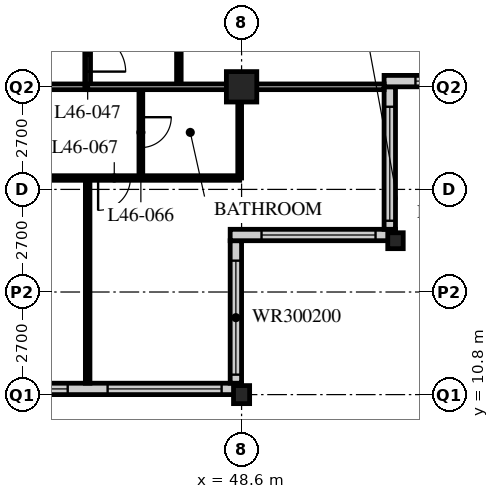
"""IFC4 building model, lengths in metres.
Left out: names, types, materials, properties, quantities, classifications, styles, units other than length and angle.
Written with IfcOpenShell. Run it as: python <this file> out.ifc"""

import sys

from ifc_helpers import new_model, si_unit, direction, frame, frame_2d, origin, origin_2d, place, context, subcontext, project, spatial, rectangle, hollow_rectangle, i_section, extrude, element, fill, save


model = new_model("IFC4")
c1 = context("Model", 3, precision=1e-05, world=origin(), true_north=direction((0.0, 1.0)))
c2 = subcontext(c1, "Body", "Model", "MODEL_VIEW")
j1 = project(units=[si_unit("LENGTHUNIT", "METRE"), si_unit("PLANEANGLEUNIT", "RADIAN")], contexts=[c1])
p1 = place(None, origin())
s1 = spatial("IfcSite", under=j1, at=p1, CompositionType="ELEMENT")
p2 = place(p1, origin())
s2 = spatial("IfcBuilding", under=s1, at=p2, CompositionType="ELEMENT")
p3 = place(p2, frame((0.0, 0.0, 181.2)))
s3 = spatial("IfcBuildingStorey", under=s2, at=p3, CompositionType="ELEMENT", Elevation=181.2)
p4 = place(p3, frame((48.6, 10.8, 0.0), z_axis=(0.0, 0.0, 1.0), x_axis=(1.0, 0.0, 0.0)))
e1 = element("IfcColumn", 1, at=p4, inside=s3, PredefinedType="COLUMN", context=c2, shape_type="SweptSolid", body=[
    extrude(i_section(OverallWidth=0.424, OverallDepth=0.475, WebThickness=0.048, FlangeThickness=0.077, FilletRadius=0.015, at=origin_2d()), origin(), (0.0, 0.0, 1.0), 3.6),
])
p5 = place(p3, frame((48.6, 18.9, 0.0), z_axis=(0.0, 0.0, 1.0), x_axis=(1.0, 0.0, 0.0)))
e2 = element("IfcColumn", 2, at=p5, inside=s3, PredefinedType="COLUMN", context=c2, shape_type="SweptSolid", body=[
    extrude(hollow_rectangle(XDim=0.8, YDim=0.8, WallThickness=0.08, at=origin_2d()), origin(), (0.0, 0.0, 1.0), 3.6),
])
p6 = place(p3, frame((52.65, 14.85, 0.0), z_axis=(0.0, 0.0, 1.0), x_axis=(1.0, 0.0, 0.0)))
e3 = element("IfcColumn", 3, at=p6, inside=s3, PredefinedType="COLUMN", context=c2, shape_type="SweptSolid", body=[
    extrude(i_section(OverallWidth=0.407, OverallDepth=0.419, WebThickness=0.031, FlangeThickness=0.049, FilletRadius=0.015, at=origin_2d()), origin(), (0.0, 0.0, 1.0), 3.6),
])
p7 = place(p3, frame((8.4, 10.95, 0.0), z_axis=(0.0, 0.0, 1.0), x_axis=(1.0, 0.0, 0.0)))
e4 = element("IfcWall", 4, at=p7, inside=s3, PredefinedType="SOLIDWALL", context=c2, shape_type="SweptSolid", body=[
    extrude(rectangle(XDim=40.2, YDim=0.3, at=frame_2d((20.1, 0.0))), origin(), (0.0, 0.0, 1.0), 3.39),
])
p8 = place(p7, frame((0.225, 0.0, 0.6)))
e5 = element("IfcOpeningElement", 5, at=p8, cuts=e4, PredefinedType="OPENING", context=c2, shape_type="SweptSolid", body=[
    extrude(rectangle(XDim=3.0, YDim=2.4, at=frame_2d((1.5, 1.2))), frame((0.0, 0.16, 0.0), z_axis=(0.0, -1.0, 0.0), x_axis=(1.0, 0.0, 0.0)), (0.0, 0.0, 1.0), 0.32),
])
p9 = place(p7, frame((4.275, 0.0, 0.6)))
e6 = element("IfcOpeningElement", 6, at=p9, cuts=e4, PredefinedType="OPENING", context=c2, shape_type="SweptSolid", body=[
    extrude(rectangle(XDim=3.0, YDim=2.4, at=frame_2d((1.5, 1.2))), frame((0.0, 0.16, 0.0), z_axis=(0.0, -1.0, 0.0), x_axis=(1.0, 0.0, 0.0)), (0.0, 0.0, 1.0), 0.32),
])
p10 = place(p7, frame((8.325, 0.0, 0.6)))
e7 = element("IfcOpeningElement", 7, at=p10, cuts=e4, PredefinedType="OPENING", context=c2, shape_type="SweptSolid", body=[
    extrude(rectangle(XDim=3.0, YDim=2.4, at=frame_2d((1.5, 1.2))), frame((0.0, 0.16, 0.0), z_axis=(0.0, -1.0, 0.0), x_axis=(1.0, 0.0, 0.0)), (0.0, 0.0, 1.0), 0.32),
])
p11 = place(p7, frame((12.375, 0.0, 0.6)))
e8 = element("IfcOpeningElement", 8, at=p11, cuts=e4, PredefinedType="OPENING", context=c2, shape_type="SweptSolid", body=[
    extrude(rectangle(XDim=3.0, YDim=2.4, at=frame_2d((1.5, 1.2))), frame((0.0, 0.16, 0.0), z_axis=(0.0, -1.0, 0.0), x_axis=(1.0, 0.0, 0.0)), (0.0, 0.0, 1.0), 0.32),
])
p12 = place(p7, frame((16.425, 0.0, 0.6)))
e9 = element("IfcOpeningElement", 9, at=p12, cuts=e4, PredefinedType="OPENING", context=c2, shape_type="SweptSolid", body=[
    extrude(rectangle(XDim=3.0, YDim=2.4, at=frame_2d((1.5, 1.2))), frame((0.0, 0.16, 0.0), z_axis=(0.0, -1.0, 0.0), x_axis=(1.0, 0.0, 0.0)), (0.0, 0.0, 1.0), 0.32),
])
p13 = place(p7, frame((20.475, 0.0, 0.6)))
e10 = element("IfcOpeningElement", 10, at=p13, cuts=e4, PredefinedType="OPENING", context=c2, shape_type="SweptSolid", body=[
    extrude(rectangle(XDim=3.0, YDim=2.4, at=frame_2d((1.5, 1.2))), frame((0.0, 0.16, 0.0), z_axis=(0.0, -1.0, 0.0), x_axis=(1.0, 0.0, 0.0)), (0.0, 0.0, 1.0), 0.32),
])
p14 = place(p7, frame((24.525, 0.0, 0.6)))
e11 = element("IfcOpeningElement", 11, at=p14, cuts=e4, PredefinedType="OPENING", context=c2, shape_type="SweptSolid", body=[
    extrude(rectangle(XDim=3.0, YDim=2.4, at=frame_2d((1.5, 1.2))), frame((0.0, 0.16, 0.0), z_axis=(0.0, -1.0, 0.0), x_axis=(1.0, 0.0, 0.0)), (0.0, 0.0, 1.0), 0.32),
])
p15 = place(p7, frame((28.575, 0.0, 0.6)))
e12 = element("IfcOpeningElement", 12, at=p15, cuts=e4, PredefinedType="OPENING", context=c2, shape_type="SweptSolid", body=[
    extrude(rectangle(XDim=3.0, YDim=2.4, at=frame_2d((1.5, 1.2))), frame((0.0, 0.16, 0.0), z_axis=(0.0, -1.0, 0.0), x_axis=(1.0, 0.0, 0.0)), (0.0, 0.0, 1.0), 0.32),
])
p16 = place(p7, frame((32.625, 0.0, 0.6)))
e13 = element("IfcOpeningElement", 13, at=p16, cuts=e4, PredefinedType="OPENING", context=c2, shape_type="SweptSolid", body=[
    extrude(rectangle(XDim=3.0, YDim=2.4, at=frame_2d((1.5, 1.2))), frame((0.0, 0.16, 0.0), z_axis=(0.0, -1.0, 0.0), x_axis=(1.0, 0.0, 0.0)), (0.0, 0.0, 1.0), 0.32),
])
p17 = place(p7, frame((36.675, 0.0, 0.6)))
e14 = element("IfcOpeningElement", 14, at=p17, cuts=e4, PredefinedType="OPENING", context=c2, shape_type="SweptSolid", body=[
    extrude(rectangle(XDim=3.0, YDim=2.4, at=frame_2d((1.5, 1.2))), frame((0.0, 0.16, 0.0), z_axis=(0.0, -1.0, 0.0), x_axis=(1.0, 0.0, 0.0)), (0.0, 0.0, 1.0), 0.32),
])
p18 = place(p3, frame((48.45, 11.1, 0.0), z_axis=(0.0, 0.0, 1.0), x_axis=(0.0, 1.0, 0.0)))
e15 = element("IfcWall", 15, at=p18, inside=s3, PredefinedType="SOLIDWALL", context=c2, shape_type="SweptSolid", body=[
    extrude(rectangle(XDim=3.75, YDim=0.3, at=frame_2d((1.875, 0.0))), origin(), (0.0, 0.0, 1.0), 3.39),
])
p19 = place(p18, frame((0.225, 0.0, 0.6)))
e16 = element("IfcOpeningElement", 16, at=p19, cuts=e15, PredefinedType="OPENING", context=c2, shape_type="SweptSolid", body=[
    extrude(rectangle(XDim=3.0, YDim=2.0, at=frame_2d((1.5, 1.0))), frame((0.0, 0.16, 0.0), z_axis=(0.0, -1.0, 0.0), x_axis=(1.0, 0.0, 0.0)), (0.0, 0.0, 1.0), 0.32),
])
p20 = place(p3, frame((48.3, 15.0, 0.0), z_axis=(0.0, 0.0, 1.0), x_axis=(1.0, 0.0, 0.0)))
e17 = element("IfcWall", 17, at=p20, inside=s3, PredefinedType="SOLIDWALL", context=c2, shape_type="SweptSolid", body=[
    extrude(rectangle(XDim=4.35, YDim=0.3, at=frame_2d((2.175, 0.0))), origin(), (0.0, 0.0, 1.0), 3.39),
])
p21 = place(p20, frame((0.825, 0.0, 0.6)))
e18 = element("IfcOpeningElement", 18, at=p21, cuts=e17, PredefinedType="OPENING", context=c2, shape_type="SweptSolid", body=[
    extrude(rectangle(XDim=3.0, YDim=2.0, at=frame_2d((1.5, 1.0))), frame((0.0, 0.16, 0.0), z_axis=(0.0, -1.0, 0.0), x_axis=(1.0, 0.0, 0.0)), (0.0, 0.0, 1.0), 0.32),
])
p22 = place(p3, frame((52.5, 15.15, 0.0), z_axis=(0.0, 0.0, 1.0), x_axis=(0.0, 1.0, 0.0)))
e19 = element("IfcWall", 19, at=p22, inside=s3, PredefinedType="SOLIDWALL", context=c2, shape_type="SweptSolid", body=[
    extrude(rectangle(XDim=3.75, YDim=0.3, at=frame_2d((1.875, 0.0))), origin(), (0.0, 0.0, 1.0), 3.39),
])
p23 = place(p22, frame((0.225, 0.0, 0.6)))
e20 = element("IfcOpeningElement", 20, at=p23, cuts=e19, PredefinedType="OPENING", context=c2, shape_type="SweptSolid", body=[
    extrude(rectangle(XDim=3.0, YDim=2.0, at=frame_2d((1.5, 1.0))), frame((0.0, 0.16, 0.0), z_axis=(0.0, -1.0, 0.0), x_axis=(1.0, 0.0, 0.0)), (0.0, 0.0, 1.0), 0.32),
])
p24 = place(p3, frame((52.35, 19.05, 0.0), z_axis=(0.0, 0.0, 1.0), x_axis=(1.0, 0.0, 0.0)))
e21 = element("IfcWall", 21, at=p24, inside=s3, PredefinedType="SOLIDWALL", context=c2, shape_type="SweptSolid", body=[
    extrude(rectangle(XDim=4.35, YDim=0.3, at=frame_2d((2.175, 0.0))), origin(), (0.0, 0.0, 1.0), 3.39),
])
p25 = place(p24, frame((0.825, 0.0, 0.6)))
e22 = element("IfcOpeningElement", 22, at=p25, cuts=e21, PredefinedType="OPENING", context=c2, shape_type="SweptSolid", body=[
    extrude(rectangle(XDim=3.0, YDim=2.0, at=frame_2d((1.5, 1.0))), frame((0.0, 0.16, 0.0), z_axis=(0.0, -1.0, 0.0), x_axis=(1.0, 0.0, 0.0)), (0.0, 0.0, 1.0), 0.32),
])
p26 = place(p3, frame((12.15, 18.9, 0.0), z_axis=(0.0, 0.0, 1.0), x_axis=(1.0, 0.0, 0.0)))
e23 = element("IfcWall", 23, at=p26, inside=s3, PredefinedType="PARTITIONING", context=c2, shape_type="SweptSolid", body=[
    extrude(rectangle(XDim=32.4, YDim=0.15, at=frame_2d((16.2, 0.0))), origin(), (0.0, 0.0, 1.0), 2.778),
])
p27 = place(p26, frame((4.95, 0.0, 0.0)))
e24 = element("IfcOpeningElement", 24, at=p27, cuts=e23, PredefinedType="OPENING", context=c2, shape_type="SweptSolid", body=[
    extrude(rectangle(XDim=1.0, YDim=2.1, at=frame_2d((0.5, 1.05))), frame((0.0, 0.085, 0.0), z_axis=(0.0, -1.0, 0.0), x_axis=(1.0, 0.0, 0.0)), (0.0, 0.0, 1.0), 0.17),
])
p28 = place(p26, frame((13.05, 0.0, 0.0)))
e25 = element("IfcOpeningElement", 25, at=p28, cuts=e23, PredefinedType="OPENING", context=c2, shape_type="SweptSolid", body=[
    extrude(rectangle(XDim=1.0, YDim=2.1, at=frame_2d((0.5, 1.05))), frame((0.0, 0.085, 0.0), z_axis=(0.0, -1.0, 0.0), x_axis=(1.0, 0.0, 0.0)), (0.0, 0.0, 1.0), 0.17),
])
p29 = place(p26, frame((21.15, 0.0, 0.0)))
e26 = element("IfcOpeningElement", 26, at=p29, cuts=e23, PredefinedType="OPENING", context=c2, shape_type="SweptSolid", body=[
    extrude(rectangle(XDim=1.0, YDim=2.1, at=frame_2d((0.5, 1.05))), frame((0.0, 0.085, 0.0), z_axis=(0.0, -1.0, 0.0), x_axis=(1.0, 0.0, 0.0)), (0.0, 0.0, 1.0), 0.17),
])
p30 = place(p26, frame((1.525, 0.0, 0.0)))
e27 = element("IfcOpeningElement", 27, at=p30, cuts=e23, PredefinedType="OPENING", context=c2, shape_type="SweptSolid", body=[
    extrude(rectangle(XDim=1.0, YDim=2.1, at=frame_2d((0.5, 1.05))), frame((0.0, 0.085, 0.0), z_axis=(0.0, -1.0, 0.0), x_axis=(1.0, 0.0, 0.0)), (0.0, 0.0, 1.0), 0.17),
])
p31 = place(p26, frame((29.875, 0.0, 0.0)))
e28 = element("IfcOpeningElement", 28, at=p31, cuts=e23, PredefinedType="OPENING", context=c2, shape_type="SweptSolid", body=[
    extrude(rectangle(XDim=1.0, YDim=2.1, at=frame_2d((0.5, 1.05))), frame((0.0, 0.085, 0.0), z_axis=(0.0, -1.0, 0.0), x_axis=(1.0, 0.0, 0.0)), (0.0, 0.0, 1.0), 0.17),
])
p32 = place(p3, frame((44.55, 18.9, 0.0), z_axis=(0.0, 0.0, 1.0), x_axis=(0.0, 1.0, 0.0)))
e29 = element("IfcWall", 29, at=p32, inside=s3, PredefinedType="PARTITIONING", context=c2, shape_type="SweptSolid", body=[
    extrude(rectangle(XDim=28.35, YDim=0.15, at=frame_2d((14.175, 0.0))), origin(), (0.0, 0.0, 1.0), 3.39),
])
p33 = place(p32, frame((0.4, 0.0, 0.0)))
e30 = element("IfcOpeningElement", 30, at=p33, cuts=e29, PredefinedType="OPENING", context=c2, shape_type="SweptSolid", body=[
    extrude(rectangle(XDim=1.0, YDim=2.1, at=frame_2d((0.5, 1.05))), frame((0.0, 0.085, 0.0), z_axis=(0.0, -1.0, 0.0), x_axis=(1.0, 0.0, 0.0)), (0.0, 0.0, 1.0), 0.17),
])
p34 = place(p32, frame((10.45, 0.0, 0.0)))
e31 = element("IfcOpeningElement", 31, at=p34, cuts=e29, PredefinedType="OPENING", context=c2, shape_type="SweptSolid", body=[
    extrude(rectangle(XDim=1.0, YDim=2.1, at=frame_2d((0.5, 1.05))), frame((0.0, 0.085, 0.0), z_axis=(0.0, -1.0, 0.0), x_axis=(1.0, 0.0, 0.0)), (0.0, 0.0, 1.0), 0.17),
])
p35 = place(p32, frame((14.5, 0.0, 0.0)))
e32 = element("IfcOpeningElement", 32, at=p35, cuts=e29, PredefinedType="OPENING", context=c2, shape_type="SweptSolid", body=[
    extrude(rectangle(XDim=1.0, YDim=2.1, at=frame_2d((0.5, 1.05))), frame((0.0, 0.085, 0.0), z_axis=(0.0, -1.0, 0.0), x_axis=(1.0, 0.0, 0.0)), (0.0, 0.0, 1.0), 0.17),
])
p36 = place(p32, frame((16.6, 0.0, 0.0)))
e33 = element("IfcOpeningElement", 33, at=p36, cuts=e29, PredefinedType="OPENING", context=c2, shape_type="SweptSolid", body=[
    extrude(rectangle(XDim=1.0, YDim=2.1, at=frame_2d((0.5, 1.05))), frame((0.0, 0.085, 0.0), z_axis=(0.0, -1.0, 0.0), x_axis=(1.0, 0.0, 0.0)), (0.0, 0.0, 1.0), 0.17),
])
p37 = place(p32, frame((26.65, 0.0, 0.0)))
e34 = element("IfcOpeningElement", 34, at=p37, cuts=e29, PredefinedType="OPENING", context=c2, shape_type="SweptSolid", body=[
    extrude(rectangle(XDim=1.0, YDim=2.1, at=frame_2d((0.5, 1.05))), frame((0.0, 0.085, 0.0), z_axis=(0.0, -1.0, 0.0), x_axis=(1.0, 0.0, 0.0)), (0.0, 0.0, 1.0), 0.17),
])
p38 = place(p3, frame((46.95, 18.9, 0.0), z_axis=(0.0, 0.0, 1.0), x_axis=(0.0, 1.0, 0.0)))
e35 = element("IfcWall", 35, at=p38, inside=s3, PredefinedType="PARTITIONING", context=c2, shape_type="SweptSolid", body=[
    extrude(rectangle(XDim=8.1, YDim=0.12, at=frame_2d((4.05, 0.0))), origin(), (0.0, 0.0, 1.0), 3.39),
])
p39 = place(p38, frame((0.975, 0.0, 0.0)))
e36 = element("IfcOpeningElement", 36, at=p39, cuts=e35, PredefinedType="OPENING", context=c2, shape_type="SweptSolid", body=[
    extrude(rectangle(XDim=0.85, YDim=2.1, at=frame_2d((0.425, 1.05))), frame((0.0, 0.07, 0.0), z_axis=(0.0, -1.0, 0.0), x_axis=(1.0, 0.0, 0.0)), (0.0, 0.0, 1.0), 0.14),
])
p40 = place(p38, frame((4.375, 0.0, 0.0)))
e37 = element("IfcOpeningElement", 37, at=p40, cuts=e35, PredefinedType="OPENING", context=c2, shape_type="SweptSolid", body=[
    extrude(rectangle(XDim=0.85, YDim=2.1, at=frame_2d((0.425, 1.05))), frame((0.0, 0.07, 0.0), z_axis=(0.0, -1.0, 0.0), x_axis=(1.0, 0.0, 0.0)), (0.0, 0.0, 1.0), 0.14),
])
p41 = place(p3, frame((8.15, 16.5, 0.0), z_axis=(0.0, 0.0, 1.0), x_axis=(1.0, 0.0, 0.0)))
e38 = element("IfcWall", 38, at=p41, inside=s3, PredefinedType="PARTITIONING", context=c2, shape_type="SweptSolid", body=[
    extrude(rectangle(XDim=40.4, YDim=0.12, at=frame_2d((20.2, 0.0))), origin(), (0.0, 0.0, 1.0), 3.39),
])
p42 = place(p41, frame((9.025, 0.0, 0.0)))
e39 = element("IfcOpeningElement", 39, at=p42, cuts=e38, PredefinedType="OPENING", context=c2, shape_type="SweptSolid", body=[
    extrude(rectangle(XDim=0.85, YDim=2.1, at=frame_2d((0.425, 1.05))), frame((0.0, 0.07, 0.0), z_axis=(0.0, -1.0, 0.0), x_axis=(1.0, 0.0, 0.0)), (0.0, 0.0, 1.0), 0.14),
])
p43 = place(p41, frame((12.425, 0.0, 0.0)))
e40 = element("IfcOpeningElement", 40, at=p43, cuts=e38, PredefinedType="OPENING", context=c2, shape_type="SweptSolid", body=[
    extrude(rectangle(XDim=0.85, YDim=2.1, at=frame_2d((0.425, 1.05))), frame((0.0, 0.07, 0.0), z_axis=(0.0, -1.0, 0.0), x_axis=(1.0, 0.0, 0.0)), (0.0, 0.0, 1.0), 0.14),
])
p44 = place(p41, frame((17.125, 0.0, 0.0)))
e41 = element("IfcOpeningElement", 41, at=p44, cuts=e38, PredefinedType="OPENING", context=c2, shape_type="SweptSolid", body=[
    extrude(rectangle(XDim=0.85, YDim=2.1, at=frame_2d((0.425, 1.05))), frame((0.0, 0.07, 0.0), z_axis=(0.0, -1.0, 0.0), x_axis=(1.0, 0.0, 0.0)), (0.0, 0.0, 1.0), 0.14),
])
p45 = place(p41, frame((20.525, 0.0, 0.0)))
e42 = element("IfcOpeningElement", 42, at=p45, cuts=e38, PredefinedType="OPENING", context=c2, shape_type="SweptSolid", body=[
    extrude(rectangle(XDim=0.85, YDim=2.1, at=frame_2d((0.425, 1.05))), frame((0.0, 0.07, 0.0), z_axis=(0.0, -1.0, 0.0), x_axis=(1.0, 0.0, 0.0)), (0.0, 0.0, 1.0), 0.14),
])
p46 = place(p41, frame((25.225, 0.0, 0.0)))
e43 = element("IfcOpeningElement", 43, at=p46, cuts=e38, PredefinedType="OPENING", context=c2, shape_type="SweptSolid", body=[
    extrude(rectangle(XDim=0.85, YDim=2.1, at=frame_2d((0.425, 1.05))), frame((0.0, 0.07, 0.0), z_axis=(0.0, -1.0, 0.0), x_axis=(1.0, 0.0, 0.0)), (0.0, 0.0, 1.0), 0.14),
])
p47 = place(p41, frame((28.625, 0.0, 0.0)))
e44 = element("IfcOpeningElement", 44, at=p47, cuts=e38, PredefinedType="OPENING", context=c2, shape_type="SweptSolid", body=[
    extrude(rectangle(XDim=0.85, YDim=2.1, at=frame_2d((0.425, 1.05))), frame((0.0, 0.07, 0.0), z_axis=(0.0, -1.0, 0.0), x_axis=(1.0, 0.0, 0.0)), (0.0, 0.0, 1.0), 0.14),
])
p48 = place(p41, frame((6.725, 0.0, 0.0)))
e45 = element("IfcOpeningElement", 45, at=p48, cuts=e38, PredefinedType="OPENING", context=c2, shape_type="SweptSolid", body=[
    extrude(rectangle(XDim=0.85, YDim=2.1, at=frame_2d((0.425, 1.05))), frame((0.0, 0.07, 0.0), z_axis=(0.0, -1.0, 0.0), x_axis=(1.0, 0.0, 0.0)), (0.0, 0.0, 1.0), 0.14),
])
p49 = place(p41, frame((2.875, 0.0, 0.0)))
e46 = element("IfcOpeningElement", 46, at=p49, cuts=e38, PredefinedType="OPENING", context=c2, shape_type="SweptSolid", body=[
    extrude(rectangle(XDim=0.85, YDim=2.1, at=frame_2d((0.425, 1.05))), frame((0.0, 0.07, 0.0), z_axis=(0.0, -1.0, 0.0), x_axis=(1.0, 0.0, 0.0)), (0.0, 0.0, 1.0), 0.14),
])
p50 = place(p41, frame((32.825, 0.0, 0.0)))
e47 = element("IfcOpeningElement", 47, at=p50, cuts=e38, PredefinedType="OPENING", context=c2, shape_type="SweptSolid", body=[
    extrude(rectangle(XDim=0.85, YDim=2.1, at=frame_2d((0.425, 1.05))), frame((0.0, 0.07, 0.0), z_axis=(0.0, -1.0, 0.0), x_axis=(1.0, 0.0, 0.0)), (0.0, 0.0, 1.0), 0.14),
])
p51 = place(p41, frame((36.675, 0.0, 0.0)))
e48 = element("IfcOpeningElement", 48, at=p51, cuts=e38, PredefinedType="OPENING", context=c2, shape_type="SweptSolid", body=[
    extrude(rectangle(XDim=0.85, YDim=2.1, at=frame_2d((0.425, 1.05))), frame((0.0, 0.07, 0.0), z_axis=(0.0, -1.0, 0.0), x_axis=(1.0, 0.0, 0.0)), (0.0, 0.0, 1.0), 0.14),
])
p52 = place(p3, frame((45.95, 18.9, 0.0), z_axis=(0.0, 0.0, 1.0), x_axis=(0.0, -1.0, 0.0)))
e49 = element("IfcWall", 49, at=p52, inside=s3, PredefinedType="PARTITIONING", context=c2, shape_type="SweptSolid", body=[
    extrude(rectangle(XDim=2.4, YDim=0.1, at=frame_2d((1.2, 0.0))), origin(), (0.0, 0.0, 1.0), 3.39),
])
p53 = place(p52, frame((0.8, 0.0, 0.0)))
e50 = element("IfcOpeningElement", 50, at=p53, cuts=e49, PredefinedType="OPENING", context=c2, shape_type="SweptSolid", body=[
    extrude(rectangle(XDim=0.8, YDim=2.1, at=frame_2d((0.4, 1.05))), frame((0.0, 0.06, 0.0), z_axis=(0.0, -1.0, 0.0), x_axis=(1.0, 0.0, 0.0)), (0.0, 0.0, 1.0), 0.12),
])
p54 = place(p3, frame((48.55, 18.9, 0.0), z_axis=(0.0, 0.0, 1.0), x_axis=(0.0, -1.0, 0.0)))
e51 = element("IfcWall", 51, at=p54, inside=s3, PredefinedType="PARTITIONING", context=c2, shape_type="SweptSolid", body=[
    extrude(rectangle(XDim=2.4, YDim=0.1, at=frame_2d((1.2, 0.0))), origin(), (0.0, 0.0, 1.0), 2.778),
])
p55 = place(p3, frame((44.55, 16.5, 0.0), z_axis=(0.0, 0.0, 1.0), x_axis=(0.0, -1.0, 0.0)))
e52 = element("IfcWall", 52, at=p55, inside=s3, PredefinedType="PARTITIONING", context=c2, shape_type="SweptSolid", body=[
    extrude(rectangle(XDim=5.4, YDim=0.12, at=frame_2d((2.7, 0.0))), origin(), (0.0, 0.0, 1.0), 3.39),
])
p56 = place(p3, frame((44.55, 18.9, 0.0), z_axis=(0.0, 0.0, 1.0), x_axis=(1.0, 0.0, 0.0)))
e53 = element("IfcWall", 53, at=p56, inside=s3, PredefinedType="PARTITIONING", context=c2, shape_type="SweptSolid", body=[
    extrude(rectangle(XDim=7.8, YDim=0.15, at=frame_2d((3.9, 0.0))), origin(), (0.0, 0.0, 1.0), 2.778),
])
p57 = place(p16, origin())
e54 = element("IfcWindow", 54, at=p57, inside=s3, PartitioningType="SINGLE_PANEL", PredefinedType="WINDOW", context=c2, shape_type="SweptSolid", body=[
    extrude(rectangle(XDim=3.0, YDim=2.4, at=frame_2d((1.5, 1.2))), frame((0.0, 0.03, 0.0), z_axis=(0.0, -1.0, 0.0), x_axis=(1.0, 0.0, 0.0)), (0.0, 0.0, 1.0), 0.06),
])
fill(e13, e54)
p58 = place(p17, origin())
e55 = element("IfcWindow", 55, at=p58, inside=s3, PartitioningType="SINGLE_PANEL", PredefinedType="WINDOW", context=c2, shape_type="SweptSolid", body=[
    extrude(rectangle(XDim=3.0, YDim=2.4, at=frame_2d((1.5, 1.2))), frame((0.0, 0.03, 0.0), z_axis=(0.0, -1.0, 0.0), x_axis=(1.0, 0.0, 0.0)), (0.0, 0.0, 1.0), 0.06),
])
fill(e14, e55)
p59 = place(p19, origin())
e56 = element("IfcWindow", 56, at=p59, inside=s3, PartitioningType="SINGLE_PANEL", PredefinedType="WINDOW", context=c2, shape_type="SweptSolid", body=[
    extrude(rectangle(XDim=3.0, YDim=2.0, at=frame_2d((1.5, 1.0))), frame((0.0, 0.03, 0.0), z_axis=(0.0, -1.0, 0.0), x_axis=(1.0, 0.0, 0.0)), (0.0, 0.0, 1.0), 0.06),
])
fill(e16, e56)
p60 = place(p21, origin())
e57 = element("IfcWindow", 57, at=p60, inside=s3, PartitioningType="SINGLE_PANEL", PredefinedType="WINDOW", context=c2, shape_type="SweptSolid", body=[
    extrude(rectangle(XDim=3.0, YDim=2.0, at=frame_2d((1.5, 1.0))), frame((0.0, 0.03, 0.0), z_axis=(0.0, -1.0, 0.0), x_axis=(1.0, 0.0, 0.0)), (0.0, 0.0, 1.0), 0.06),
])
fill(e18, e57)
p61 = place(p23, origin())
e58 = element("IfcWindow", 58, at=p61, inside=s3, PartitioningType="SINGLE_PANEL", PredefinedType="WINDOW", context=c2, shape_type="SweptSolid", body=[
    extrude(rectangle(XDim=3.0, YDim=2.0, at=frame_2d((1.5, 1.0))), frame((0.0, 0.03, 0.0), z_axis=(0.0, -1.0, 0.0), x_axis=(1.0, 0.0, 0.0)), (0.0, 0.0, 1.0), 0.06),
])
fill(e20, e58)
p62 = place(p25, origin())
e59 = element("IfcWindow", 59, at=p62, inside=s3, PartitioningType="SINGLE_PANEL", PredefinedType="WINDOW", context=c2, shape_type="SweptSolid", body=[
    extrude(rectangle(XDim=3.0, YDim=2.0, at=frame_2d((1.5, 1.0))), frame((0.0, 0.03, 0.0), z_axis=(0.0, -1.0, 0.0), x_axis=(1.0, 0.0, 0.0)), (0.0, 0.0, 1.0), 0.06),
])
fill(e22, e59)
p63 = place(p33, origin())
e60 = element("IfcDoor", 60, at=p63, inside=s3, OperationType="SINGLE_SWING_RIGHT", PredefinedType="DOOR", context=c2, shape_type="SweptSolid", body=[
    extrude(rectangle(XDim=1.0, YDim=2.1, at=frame_2d((0.5, 1.05))), frame((0.0, 0.025, 0.0), z_axis=(0.0, -1.0, 0.0), x_axis=(1.0, 0.0, 0.0)), (0.0, 0.0, 1.0), 0.05),
])
fill(e30, e60)
p64 = place(p53, origin())
e61 = element("IfcDoor", 61, at=p64, inside=s3, OperationType="SINGLE_SWING_LEFT", PredefinedType="DOOR", context=c2, shape_type="SweptSolid", body=[
    extrude(rectangle(XDim=0.8, YDim=2.1, at=frame_2d((0.4, 1.05))), frame((0.0, 0.025, 0.0), z_axis=(0.0, -1.0, 0.0), x_axis=(1.0, 0.0, 0.0)), (0.0, 0.0, 1.0), 0.05),
])
fill(e50, e61)
p65 = place(p51, origin())
e62 = element("IfcDoor", 62, at=p65, inside=s3, OperationType="SINGLE_SWING_RIGHT", PredefinedType="DOOR", context=c2, shape_type="SweptSolid", body=[
    extrude(rectangle(XDim=0.85, YDim=2.1, at=frame_2d((0.425, 1.05))), frame((0.0, 0.025, 0.0), z_axis=(0.0, -1.0, 0.0), x_axis=(1.0, 0.0, 0.0)), (0.0, 0.0, 1.0), 0.05),
])
fill(e48, e62)
save(model, sys.argv[1])
